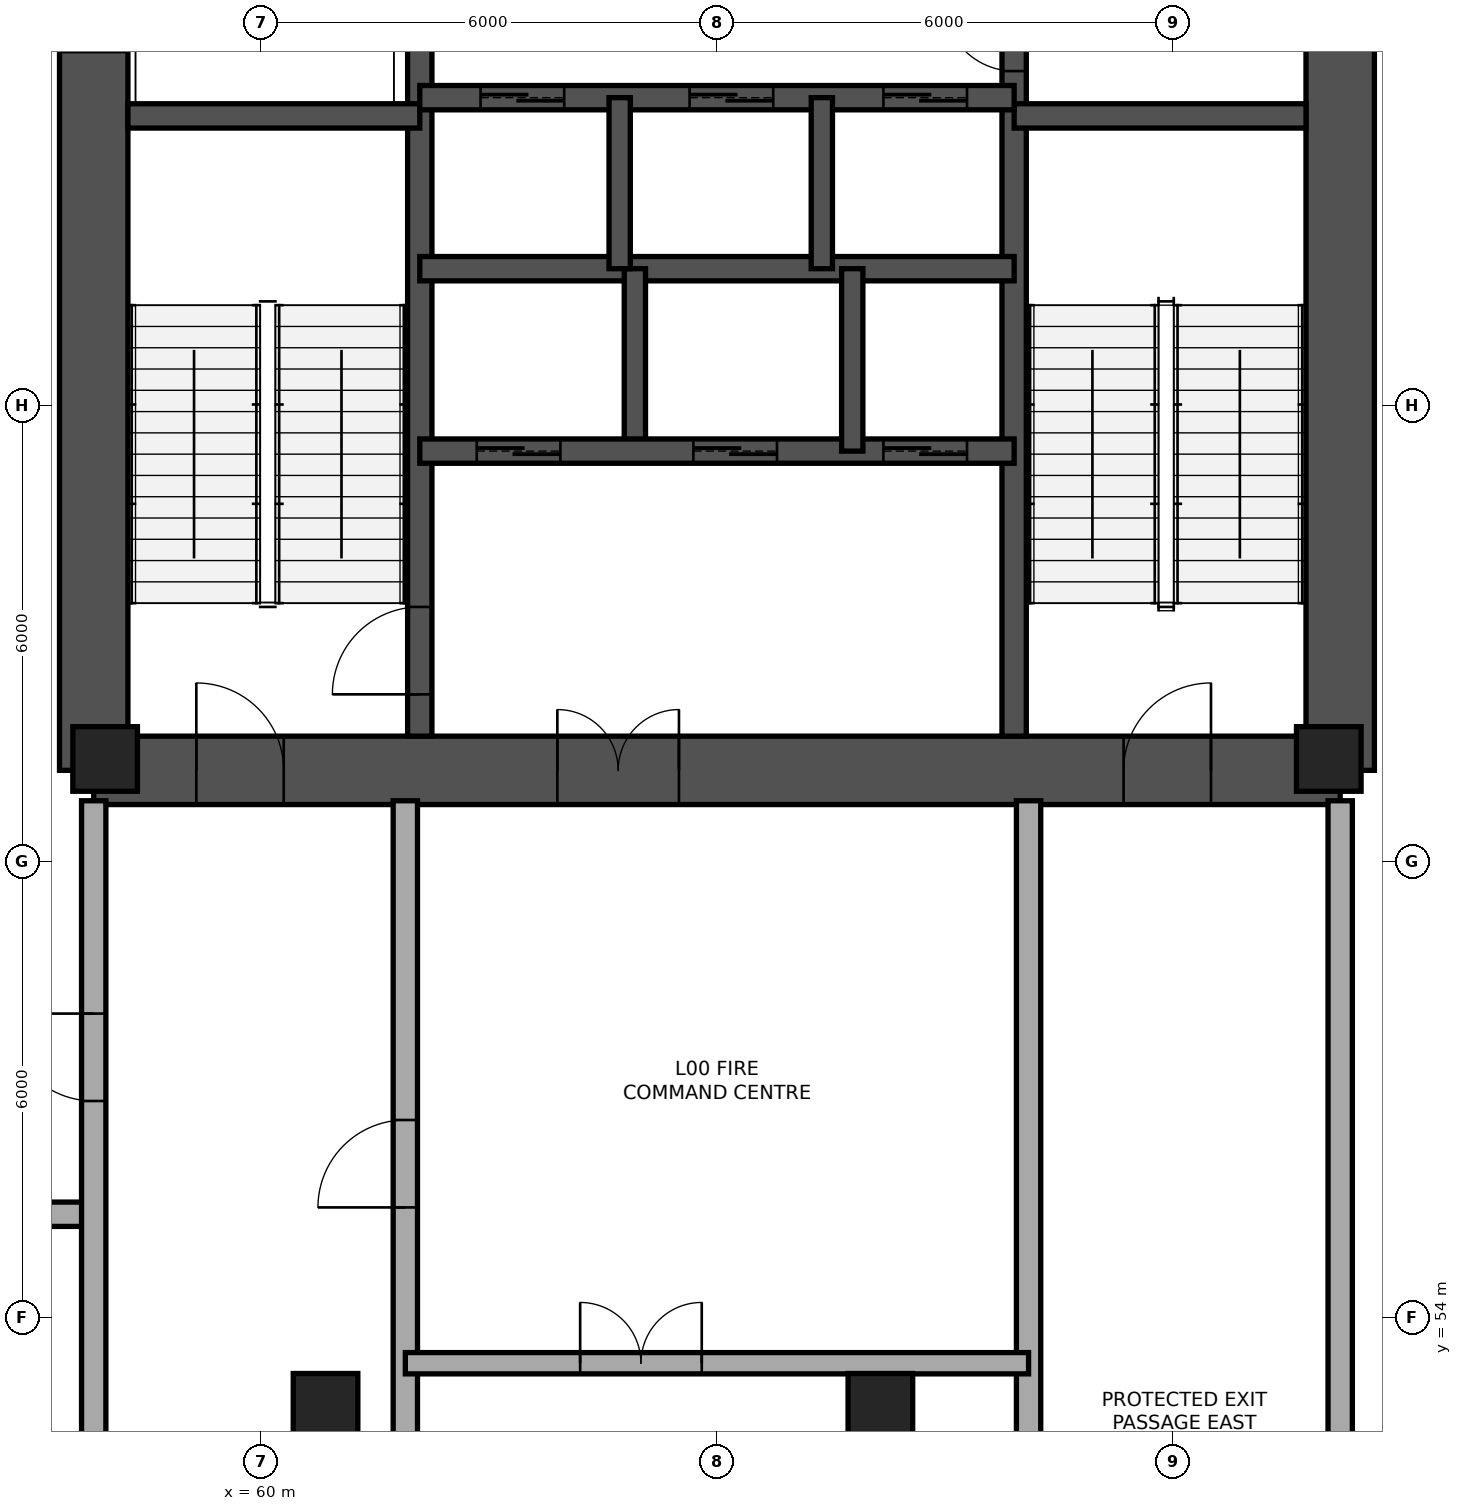
"""IFC4 building model, lengths in metres.
Left out: names, types, materials, properties, quantities, classifications, styles, units other than length and angle.
Written with IfcOpenShell. Run it as: python <this file> out.ifc"""

import sys

from ifc_helpers import new_model, si_unit, direction, frame, frame_2d, origin, origin_2d, place, context, subcontext, project, spatial, rectangle, extrude, element, fill, save


model = new_model("IFC4")
c1 = context("Model", 3, precision=1e-05, world=origin(), true_north=direction((0.0, 1.0)))
c2 = subcontext(c1, "Body", "Model", "MODEL_VIEW")
j1 = project(units=[si_unit("LENGTHUNIT", "METRE"), si_unit("PLANEANGLEUNIT", "RADIAN")], contexts=[c1])
p1 = place(None, origin())
s1 = spatial("IfcSite", under=j1, at=p1, CompositionType="ELEMENT")
p2 = place(p1, origin())
s2 = spatial("IfcBuilding", under=s1, at=p2, CompositionType="ELEMENT")
p3 = place(p2, origin())
s3 = spatial("IfcBuildingStorey", under=s2, at=p3, CompositionType="ELEMENT", Elevation=0.0)
p4 = place(p3, frame((57.8, 61.2, 0.0), z_axis=(0.0, 0.0, 1.0), x_axis=(1.0, 0.0, 0.0)))
e1 = element("IfcWall", 1, at=p4, inside=s3, PredefinedType="SHEAR", context=c2, shape_type="SweptSolid", body=[
    extrude(rectangle(XDim=16.4, YDim=0.9, at=frame_2d((8.2, 0.0))), origin(), (0.0, 0.0, 1.0), 5.4),
])
p5 = place(p4, frame((1.35, 0.0, 0.0)))
e2 = element("IfcOpeningElement", 2, at=p5, cuts=e1, PredefinedType="OPENING", context=c2, shape_type="SweptSolid", body=[
    extrude(rectangle(XDim=1.15, YDim=2.15, at=frame_2d((0.575, 1.075))), frame((0.0, 0.46, 0.0), z_axis=(0.0, -1.0, 0.0), x_axis=(1.0, 0.0, 0.0)), (0.0, 0.0, 1.0), 0.92),
])
p6 = place(p4, frame((6.1, 0.0, 0.0)))
e3 = element("IfcOpeningElement", 3, at=p6, cuts=e1, PredefinedType="OPENING", context=c2, shape_type="SweptSolid", body=[
    extrude(rectangle(XDim=1.6, YDim=2.15, at=frame_2d((0.8, 1.075))), frame((0.0, 0.46, 0.0), z_axis=(0.0, -1.0, 0.0), x_axis=(1.0, 0.0, 0.0)), (0.0, 0.0, 1.0), 0.92),
])
p7 = place(p4, frame((13.55, 0.0, 0.0)))
e4 = element("IfcOpeningElement", 4, at=p7, cuts=e1, PredefinedType="OPENING", context=c2, shape_type="SweptSolid", body=[
    extrude(rectangle(XDim=1.15, YDim=2.15, at=frame_2d((0.575, 1.075))), frame((0.0, 0.46, 0.0), z_axis=(0.0, -1.0, 0.0), x_axis=(1.0, 0.0, 0.0)), (0.0, 0.0, 1.0), 0.92),
])
p8 = place(p3, frame((74.2, 61.2, 0.0), z_axis=(0.0, 0.0, 1.0), x_axis=(0.0, 1.0, 0.0)))
e5 = element("IfcWall", 5, at=p8, inside=s3, PredefinedType="SHEAR", context=c2, shape_type="SweptSolid", body=[
    extrude(rectangle(XDim=13.6, YDim=0.9, at=frame_2d((6.8, 0.0))), origin(), (0.0, 0.0, 1.0), 5.4),
])
p9 = place(p3, frame((57.8, 74.8, 0.0), z_axis=(0.0, 0.0, 1.0), x_axis=(0.0, -1.0, 0.0)))
e6 = element("IfcWall", 6, at=p9, inside=s3, PredefinedType="SHEAR", context=c2, shape_type="SweptSolid", body=[
    extrude(rectangle(XDim=13.6, YDim=0.9, at=frame_2d((6.8, 0.0))), origin(), (0.0, 0.0, 1.0), 5.4),
])
p10 = place(p9, frame((0.85, 0.0, 0.0)))
e7 = element("IfcOpeningElement", 7, at=p10, cuts=e6, PredefinedType="OPENING", context=c2, shape_type="SweptSolid", body=[
    extrude(rectangle(XDim=0.92, YDim=2.05, at=frame_2d((0.46, 1.025))), frame((0.0, 0.46, 0.0), z_axis=(0.0, -1.0, 0.0), x_axis=(1.0, 0.0, 0.0)), (0.0, 0.0, 1.0), 0.92),
])
p11 = place(p9, frame((2.55, 0.0, 0.0)))
e8 = element("IfcOpeningElement", 8, at=p11, cuts=e6, PredefinedType="OPENING", context=c2, shape_type="SweptSolid", body=[
    extrude(rectangle(XDim=1.6, YDim=2.3, at=frame_2d((0.8, 1.15))), frame((0.0, 0.46, 0.0), z_axis=(0.0, -1.0, 0.0), x_axis=(1.0, 0.0, 0.0)), (0.0, 0.0, 1.0), 0.92),
])
p12 = place(p3, frame((62.09, 61.65, 0.0), z_axis=(0.0, 0.0, 1.0), x_axis=(0.0, 1.0, 0.0)))
e9 = element("IfcWall", 9, at=p12, inside=s3, PredefinedType="SHEAR", context=c2, shape_type="SweptSolid", body=[
    extrude(rectangle(XDim=12.7, YDim=0.32, at=frame_2d((6.35, 0.0))), origin(), (0.0, 0.0, 1.0), 5.4),
])
p13 = place(p12, frame((0.55, 0.0, 0.0)))
e10 = element("IfcOpeningElement", 10, at=p13, cuts=e9, PredefinedType="OPENING", context=c2, shape_type="SweptSolid", body=[
    extrude(rectangle(XDim=1.15, YDim=2.15, at=frame_2d((0.575, 1.075))), frame((0.0, 0.17, 0.0), z_axis=(0.0, -1.0, 0.0), x_axis=(1.0, 0.0, 0.0)), (0.0, 0.0, 1.0), 0.34),
])
p14 = place(p3, frame((69.91, 61.65, 0.0), z_axis=(0.0, 0.0, 1.0), x_axis=(0.0, 1.0, 0.0)))
e11 = element("IfcWall", 11, at=p14, inside=s3, PredefinedType="SHEAR", context=c2, shape_type="SweptSolid", body=[
    extrude(rectangle(XDim=12.7, YDim=0.32, at=frame_2d((6.35, 0.0))), origin(), (0.0, 0.0, 1.0), 5.4),
])
p15 = place(p14, frame((8.75, 0.0, 0.0)))
e12 = element("IfcOpeningElement", 12, at=p15, cuts=e11, PredefinedType="OPENING", context=c2, shape_type="SweptSolid", body=[
    extrude(rectangle(XDim=0.92, YDim=2.05, at=frame_2d((0.46, 1.025))), frame((0.0, 0.17, 0.0), z_axis=(0.0, -1.0, 0.0), x_axis=(1.0, 0.0, 0.0)), (0.0, 0.0, 1.0), 0.34),
])
for number, where, z_axis, x_axis in (
    (13, (58.25, 69.81, 0.0), (0.0, 0.0, 1.0), (1.0, 0.0, 0.0)),
    (14, (69.91, 69.81, 0.0), (0.0, 0.0, 1.0), (1.0, 0.0, 0.0)),
):
    element("IfcWall", number, at=place(p3, frame(where, z_axis=z_axis, x_axis=x_axis)), inside=s3, PredefinedType="SHEAR", context=c2, shape_type="SweptSolid", body=[
        extrude(rectangle(XDim=3.84, YDim=0.32, at=frame_2d((1.92, 0.0))), origin(), (0.0, 0.0, 1.0), 5.4),
    ])
p16 = place(p3, frame((62.09, 67.8, 0.0), z_axis=(0.0, 0.0, 1.0), x_axis=(1.0, 0.0, 0.0)))
e15 = element("IfcWall", 15, at=p16, inside=s3, PredefinedType="SHEAR", context=c2, shape_type="SweptSolid", body=[
    extrude(rectangle(XDim=7.82, YDim=0.32, at=frame_2d((3.91, 0.0))), origin(), (0.0, 0.0, 1.0), 5.4),
])
p17 = place(p3, frame((64.92, 65.4, 0.0), z_axis=(0.0, 0.0, 1.0), x_axis=(0.0, 1.0, 0.0)))
e16 = element("IfcWall", 16, at=p17, inside=s3, PredefinedType="SHEAR", context=c2, shape_type="SweptSolid", body=[
    extrude(rectangle(XDim=2.4, YDim=0.28, at=frame_2d((1.2, 0.0))), origin(), (0.0, 0.0, 1.0), 5.4),
])
p18 = place(p3, frame((62.09, 70.05, 0.0), z_axis=(0.0, 0.0, 1.0), x_axis=(1.0, 0.0, 0.0)))
e17 = element("IfcWall", 17, at=p18, inside=s3, PredefinedType="SHEAR", context=c2, shape_type="SweptSolid", body=[
    extrude(rectangle(XDim=7.82, YDim=0.32, at=frame_2d((3.91, 0.0))), origin(), (0.0, 0.0, 1.0), 5.4),
])
p19 = place(p18, frame((0.8, 0.0, 0.0)))
e18 = element("IfcOpeningElement", 18, at=p19, cuts=e17, PredefinedType="OPENING", context=c2, shape_type="SweptSolid", body=[
    extrude(rectangle(XDim=1.1, YDim=2.2, at=frame_2d((0.55, 1.1))), frame((0.0, 0.17, 0.0), z_axis=(0.0, -1.0, 0.0), x_axis=(1.0, 0.0, 0.0)), (0.0, 0.0, 1.0), 0.34),
])
p20 = place(p18, frame((3.55, 0.0, 0.0)))
e19 = element("IfcOpeningElement", 19, at=p20, cuts=e17, PredefinedType="OPENING", context=c2, shape_type="SweptSolid", body=[
    extrude(rectangle(XDim=1.1, YDim=2.2, at=frame_2d((0.55, 1.1))), frame((0.0, 0.17, 0.0), z_axis=(0.0, -1.0, 0.0), x_axis=(1.0, 0.0, 0.0)), (0.0, 0.0, 1.0), 0.34),
])
p21 = place(p18, frame((6.1, 0.0, 0.0)))
e20 = element("IfcOpeningElement", 20, at=p21, cuts=e17, PredefinedType="OPENING", context=c2, shape_type="SweptSolid", body=[
    extrude(rectangle(XDim=1.1, YDim=2.2, at=frame_2d((0.55, 1.1))), frame((0.0, 0.17, 0.0), z_axis=(0.0, -1.0, 0.0), x_axis=(1.0, 0.0, 0.0)), (0.0, 0.0, 1.0), 0.34),
])
p22 = place(p3, frame((62.09, 65.4, 0.0), z_axis=(0.0, 0.0, 1.0), x_axis=(1.0, 0.0, 0.0)))
e21 = element("IfcWall", 21, at=p22, inside=s3, PredefinedType="SHEAR", context=c2, shape_type="SweptSolid", body=[
    extrude(rectangle(XDim=7.82, YDim=0.32, at=frame_2d((3.91, 0.0))), origin(), (0.0, 0.0, 1.0), 5.4),
])
p23 = place(p22, frame((6.1, 0.0, 0.0)))
e22 = element("IfcOpeningElement", 22, at=p23, cuts=e21, PredefinedType="OPENING", context=c2, shape_type="SweptSolid", body=[
    extrude(rectangle(XDim=1.1, YDim=2.2, at=frame_2d((0.55, 1.1))), frame((0.0, 0.17, 0.0), z_axis=(0.0, -1.0, 0.0), x_axis=(1.0, 0.0, 0.0)), (0.0, 0.0, 1.0), 0.34),
])
p24 = place(p22, frame((0.75, 0.0, 0.0)))
e23 = element("IfcOpeningElement", 23, at=p24, cuts=e21, PredefinedType="OPENING", context=c2, shape_type="SweptSolid", body=[
    extrude(rectangle(XDim=1.1, YDim=2.2, at=frame_2d((0.55, 1.1))), frame((0.0, 0.17, 0.0), z_axis=(0.0, -1.0, 0.0), x_axis=(1.0, 0.0, 0.0)), (0.0, 0.0, 1.0), 0.34),
])
p25 = place(p22, frame((3.6, 0.0, 0.0)))
e24 = element("IfcOpeningElement", 24, at=p25, cuts=e21, PredefinedType="OPENING", context=c2, shape_type="SweptSolid", body=[
    extrude(rectangle(XDim=1.1, YDim=2.2, at=frame_2d((0.55, 1.1))), frame((0.0, 0.17, 0.0), z_axis=(0.0, -1.0, 0.0), x_axis=(1.0, 0.0, 0.0)), (0.0, 0.0, 1.0), 0.34),
])
p26 = place(p3, frame((67.78, 65.4, 0.0), z_axis=(0.0, 0.0, 1.0), x_axis=(0.0, 1.0, 0.0)))
e25 = element("IfcWall", 25, at=p26, inside=s3, PredefinedType="SHEAR", context=c2, shape_type="SweptSolid", body=[
    extrude(rectangle(XDim=2.4, YDim=0.28, at=frame_2d((1.2, 0.0))), origin(), (0.0, 0.0, 1.0), 5.4),
])
for number, where, z_axis, x_axis in (
    (26, (64.72, 67.8, 0.0), (0.0, 0.0, 1.0), (0.0, 1.0, 0.0)),
    (27, (67.38, 67.8, 0.0), (0.0, 0.0, 1.0), (0.0, 1.0, 0.0)),
):
    element("IfcWall", number, at=place(p3, frame(where, z_axis=z_axis, x_axis=x_axis)), inside=s3, PredefinedType="SHEAR", context=c2, shape_type="SweptSolid", body=[
        extrude(rectangle(XDim=2.25, YDim=0.28, at=frame_2d((1.125, 0.0))), origin(), (0.0, 0.0, 1.0), 5.4),
    ])
for number, where, z_axis, x_axis in (
    (28, (57.95, 61.35, 0.0), (0.0, 0.0, 1.0), (1.0, 0.0, 0.0)),
    (29, (74.05, 61.35, 0.0), (0.0, 0.0, 1.0), (1.0, 0.0, 0.0)),
    (30, (60.85, 52.84, 0.0), (0.0, 0.0, 1.0), (1.0, 0.0, 0.0)),
    (31, (68.15, 52.84, 0.0), (0.0, 0.0, 1.0), (1.0, 0.0, 0.0)),
):
    element("IfcColumn", number, at=place(p3, frame(where, z_axis=z_axis, x_axis=x_axis)), inside=s3, PredefinedType="COLUMN", context=c2, shape_type="SweptSolid", body=[
        extrude(rectangle(XDim=0.85, YDim=0.85, at=origin_2d()), origin(), (0.0, 0.0, 1.0), 5.4),
    ])
p27 = place(p3, frame((53.04, 55.36, 0.0), z_axis=(0.0, 0.0, 1.0), x_axis=(1.0, 0.0, 0.0)))
e32 = element("IfcWall", 32, at=p27, inside=s3, PredefinedType="STANDARD", context=c2, shape_type="SweptSolid", body=[
    extrude(rectangle(XDim=4.76, YDim=0.32, at=frame_2d((2.38, 0.0))), origin(), (0.0, 0.0, 1.0), 4.08),
])
p28 = place(p27, frame((1.8, 0.0, 0.0)))
e33 = element("IfcOpeningElement", 33, at=p28, cuts=e32, PredefinedType="OPENING", context=c2, shape_type="SweptSolid", body=[
    extrude(rectangle(XDim=1.15, YDim=2.15, at=frame_2d((0.575, 1.075))), frame((0.0, 0.17, 0.0), z_axis=(0.0, -1.0, 0.0), x_axis=(1.0, 0.0, 0.0)), (0.0, 0.0, 1.0), 0.34),
])
p29 = place(p3, frame((57.8, 44.05, 0.0), z_axis=(0.0, 0.0, 1.0), x_axis=(0.0, 1.0, 0.0)))
e34 = element("IfcWall", 34, at=p29, inside=s3, PredefinedType="STANDARD", context=c2, shape_type="SweptSolid", body=[
    extrude(rectangle(XDim=16.75, YDim=0.32, at=frame_2d((8.375, 0.0))), origin(), (0.0, 0.0, 1.0), 4.08),
])
p30 = place(p29, frame((12.8, 0.0, 0.0)))
e35 = element("IfcOpeningElement", 35, at=p30, cuts=e34, PredefinedType="OPENING", context=c2, shape_type="SweptSolid", body=[
    extrude(rectangle(XDim=1.15, YDim=2.15, at=frame_2d((0.575, 1.075))), frame((0.0, 0.17, 0.0), z_axis=(0.0, -1.0, 0.0), x_axis=(1.0, 0.0, 0.0)), (0.0, 0.0, 1.0), 0.34),
])
p31 = place(p3, frame((61.9, 44.05, 0.0), z_axis=(0.0, 0.0, 1.0), x_axis=(0.0, 1.0, 0.0)))
e36 = element("IfcWall", 36, at=p31, inside=s3, PredefinedType="STANDARD", context=c2, shape_type="SweptSolid", body=[
    extrude(rectangle(XDim=16.75, YDim=0.32, at=frame_2d((8.375, 0.0))), origin(), (0.0, 0.0, 1.0), 4.08),
])
p32 = place(p31, frame((11.4, 0.0, 0.0)))
e37 = element("IfcOpeningElement", 37, at=p32, cuts=e36, PredefinedType="OPENING", context=c2, shape_type="SweptSolid", body=[
    extrude(rectangle(XDim=1.15, YDim=2.15, at=frame_2d((0.575, 1.075))), frame((0.0, 0.17, 0.0), z_axis=(0.0, -1.0, 0.0), x_axis=(1.0, 0.0, 0.0)), (0.0, 0.0, 1.0), 0.34),
])
p33 = place(p3, frame((70.1, 44.05, 0.0), z_axis=(0.0, 0.0, 1.0), x_axis=(0.0, 1.0, 0.0)))
e38 = element("IfcWall", 38, at=p33, inside=s3, PredefinedType="STANDARD", context=c2, shape_type="SweptSolid", body=[
    extrude(rectangle(XDim=16.75, YDim=0.32, at=frame_2d((8.375, 0.0))), origin(), (0.0, 0.0, 1.0), 4.08),
])
p34 = place(p33, frame((3.5, 0.0, 0.0)))
e39 = element("IfcOpeningElement", 39, at=p34, cuts=e38, PredefinedType="OPENING", context=c2, shape_type="SweptSolid", body=[
    extrude(rectangle(XDim=1.15, YDim=2.15, at=frame_2d((0.575, 1.075))), frame((0.0, 0.17, 0.0), z_axis=(0.0, -1.0, 0.0), x_axis=(1.0, 0.0, 0.0)), (0.0, 0.0, 1.0), 0.34),
])
p35 = place(p3, frame((74.2, 44.05, 0.0), z_axis=(0.0, 0.0, 1.0), x_axis=(0.0, 1.0, 0.0)))
e40 = element("IfcWall", 40, at=p35, inside=s3, PredefinedType="STANDARD", context=c2, shape_type="SweptSolid", body=[
    extrude(rectangle(XDim=16.75, YDim=0.32, at=frame_2d((8.375, 0.0))), origin(), (0.0, 0.0, 1.0), 4.08),
])
p36 = place(p35, frame((6.425, 0.0, 0.0)))
e41 = element("IfcOpeningElement", 41, at=p36, cuts=e40, PredefinedType="OPENING", context=c2, shape_type="SweptSolid", body=[
    extrude(rectangle(XDim=1.15, YDim=2.15, at=frame_2d((0.575, 1.075))), frame((0.0, 0.17, 0.0), z_axis=(0.0, -1.0, 0.0), x_axis=(1.0, 0.0, 0.0)), (0.0, 0.0, 1.0), 0.34),
])
p37 = place(p3, frame((61.9, 53.4, 0.0), z_axis=(0.0, 0.0, 1.0), x_axis=(1.0, 0.0, 0.0)))
e42 = element("IfcWall", 42, at=p37, inside=s3, PredefinedType="STANDARD", context=c2, shape_type="SweptSolid", body=[
    extrude(rectangle(XDim=8.2, YDim=0.28, at=frame_2d((4.1, 0.0))), origin(), (0.0, 0.0, 1.0), 4.08),
])
p38 = place(p37, frame((2.3, 0.0, 0.0)))
e43 = element("IfcOpeningElement", 43, at=p38, cuts=e42, PredefinedType="OPENING", context=c2, shape_type="SweptSolid", body=[
    extrude(rectangle(XDim=1.6, YDim=2.15, at=frame_2d((0.8, 1.075))), frame((0.0, 0.15, 0.0), z_axis=(0.0, -1.0, 0.0), x_axis=(1.0, 0.0, 0.0)), (0.0, 0.0, 1.0), 0.3),
])
p39 = place(p13, origin())
e44 = element("IfcDoor", 44, at=p39, inside=s3, OperationType="SINGLE_SWING_LEFT", PredefinedType="DOOR", context=c2, shape_type="SweptSolid", body=[
    extrude(rectangle(XDim=1.15, YDim=2.15, at=frame_2d((0.575, 1.075))), frame((0.0, 0.025, 0.0), z_axis=(0.0, -1.0, 0.0), x_axis=(1.0, 0.0, 0.0)), (0.0, 0.0, 1.0), 0.05),
])
fill(e10, e44)
p40 = place(p23, origin())
e45 = element("IfcDoor", 45, at=p40, inside=s3, OperationType="SLIDING_TO_LEFT", PredefinedType="DOOR", context=c2, shape_type="SweptSolid", body=[
    extrude(rectangle(XDim=1.1, YDim=2.2, at=frame_2d((0.55, 1.1))), frame((0.0, 0.025, 0.0), z_axis=(0.0, -1.0, 0.0), x_axis=(1.0, 0.0, 0.0)), (0.0, 0.0, 1.0), 0.05),
])
fill(e22, e45)
p41 = place(p24, origin())
e46 = element("IfcDoor", 46, at=p41, inside=s3, OperationType="SLIDING_TO_LEFT", PredefinedType="DOOR", context=c2, shape_type="SweptSolid", body=[
    extrude(rectangle(XDim=1.1, YDim=2.2, at=frame_2d((0.55, 1.1))), frame((0.0, 0.025, 0.0), z_axis=(0.0, -1.0, 0.0), x_axis=(1.0, 0.0, 0.0)), (0.0, 0.0, 1.0), 0.05),
])
fill(e23, e46)
p42 = place(p25, origin())
e47 = element("IfcDoor", 47, at=p42, inside=s3, OperationType="SLIDING_TO_LEFT", PredefinedType="DOOR", context=c2, shape_type="SweptSolid", body=[
    extrude(rectangle(XDim=1.1, YDim=2.2, at=frame_2d((0.55, 1.1))), frame((0.0, 0.025, 0.0), z_axis=(0.0, -1.0, 0.0), x_axis=(1.0, 0.0, 0.0)), (0.0, 0.0, 1.0), 0.05),
])
fill(e24, e47)
p43 = place(p19, origin())
e48 = element("IfcDoor", 48, at=p43, inside=s3, OperationType="SLIDING_TO_LEFT", PredefinedType="DOOR", context=c2, shape_type="SweptSolid", body=[
    extrude(rectangle(XDim=1.1, YDim=2.2, at=frame_2d((0.55, 1.1))), frame((0.0, 0.025, 0.0), z_axis=(0.0, -1.0, 0.0), x_axis=(1.0, 0.0, 0.0)), (0.0, 0.0, 1.0), 0.05),
])
fill(e18, e48)
p44 = place(p20, origin())
e49 = element("IfcDoor", 49, at=p44, inside=s3, OperationType="SLIDING_TO_LEFT", PredefinedType="DOOR", context=c2, shape_type="SweptSolid", body=[
    extrude(rectangle(XDim=1.1, YDim=2.2, at=frame_2d((0.55, 1.1))), frame((0.0, 0.025, 0.0), z_axis=(0.0, -1.0, 0.0), x_axis=(1.0, 0.0, 0.0)), (0.0, 0.0, 1.0), 0.05),
])
fill(e19, e49)
p45 = place(p21, origin())
e50 = element("IfcDoor", 50, at=p45, inside=s3, OperationType="SLIDING_TO_LEFT", PredefinedType="DOOR", context=c2, shape_type="SweptSolid", body=[
    extrude(rectangle(XDim=1.1, YDim=2.2, at=frame_2d((0.55, 1.1))), frame((0.0, 0.025, 0.0), z_axis=(0.0, -1.0, 0.0), x_axis=(1.0, 0.0, 0.0)), (0.0, 0.0, 1.0), 0.05),
])
fill(e20, e50)
p46 = place(p5, origin())
e51 = element("IfcDoor", 51, at=p46, inside=s3, OperationType="SINGLE_SWING_LEFT", PredefinedType="DOOR", context=c2, shape_type="SweptSolid", body=[
    extrude(rectangle(XDim=1.15, YDim=2.15, at=frame_2d((0.575, 1.075))), frame((0.0, 0.025, 0.0), z_axis=(0.0, -1.0, 0.0), x_axis=(1.0, 0.0, 0.0)), (0.0, 0.0, 1.0), 0.05),
])
fill(e2, e51)
p47 = place(p6, origin())
e52 = element("IfcDoor", 52, at=p47, inside=s3, OperationType="DOUBLE_DOOR_SINGLE_SWING", PredefinedType="DOOR", context=c2, shape_type="SweptSolid", body=[
    extrude(rectangle(XDim=1.6, YDim=2.15, at=frame_2d((0.8, 1.075))), frame((0.0, 0.025, 0.0), z_axis=(0.0, -1.0, 0.0), x_axis=(1.0, 0.0, 0.0)), (0.0, 0.0, 1.0), 0.05),
])
fill(e3, e52)
p48 = place(p7, origin())
e53 = element("IfcDoor", 53, at=p48, inside=s3, OperationType="SINGLE_SWING_RIGHT", PredefinedType="DOOR", context=c2, shape_type="SweptSolid", body=[
    extrude(rectangle(XDim=1.15, YDim=2.15, at=frame_2d((0.575, 1.075))), frame((0.0, 0.025, 0.0), z_axis=(0.0, -1.0, 0.0), x_axis=(1.0, 0.0, 0.0)), (0.0, 0.0, 1.0), 0.05),
])
fill(e4, e53)
p49 = place(p15, origin())
e54 = element("IfcDoor", 54, at=p49, inside=s3, OperationType="SINGLE_SWING_RIGHT", PredefinedType="DOOR", context=c2, shape_type="SweptSolid", body=[
    extrude(rectangle(XDim=0.92, YDim=2.05, at=frame_2d((0.46, 1.025))), frame((0.0, 0.025, 0.0), z_axis=(0.0, -1.0, 0.0), x_axis=(1.0, 0.0, 0.0)), (0.0, 0.0, 1.0), 0.05),
])
fill(e12, e54)
p50 = place(p30, origin())
e55 = element("IfcDoor", 55, at=p50, inside=s3, OperationType="SINGLE_SWING_RIGHT", PredefinedType="DOOR", context=c2, shape_type="SweptSolid", body=[
    extrude(rectangle(XDim=1.15, YDim=2.15, at=frame_2d((0.575, 1.075))), frame((0.0, 0.025, 0.0), z_axis=(0.0, -1.0, 0.0), x_axis=(1.0, 0.0, 0.0)), (0.0, 0.0, 1.0), 0.05),
])
fill(e35, e55)
p51 = place(p32, origin())
e56 = element("IfcDoor", 56, at=p51, inside=s3, OperationType="SINGLE_SWING_LEFT", PredefinedType="DOOR", context=c2, shape_type="SweptSolid", body=[
    extrude(rectangle(XDim=1.15, YDim=2.15, at=frame_2d((0.575, 1.075))), frame((0.0, 0.025, 0.0), z_axis=(0.0, -1.0, 0.0), x_axis=(1.0, 0.0, 0.0)), (0.0, 0.0, 1.0), 0.05),
])
fill(e37, e56)
p52 = place(p38, origin())
e57 = element("IfcDoor", 57, at=p52, inside=s3, OperationType="DOUBLE_DOOR_SINGLE_SWING", PredefinedType="DOOR", context=c2, shape_type="SweptSolid", body=[
    extrude(rectangle(XDim=1.6, YDim=2.15, at=frame_2d((0.8, 1.075))), frame((0.0, 0.025, 0.0), z_axis=(0.0, -1.0, 0.0), x_axis=(1.0, 0.0, 0.0)), (0.0, 0.0, 1.0), 0.05),
])
fill(e43, e57)
save(model, sys.argv[1])
